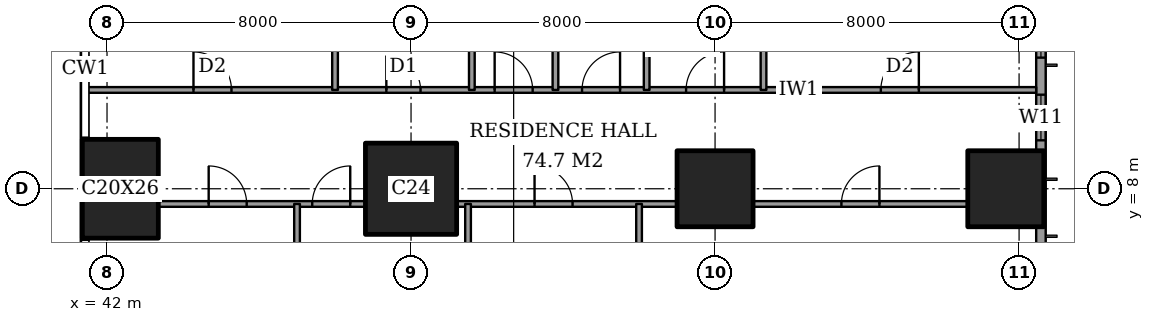
"""IFC4 building model, lengths in metres.
Left out: names, types, materials, properties, quantities, classifications, styles, units other than length and angle.
Written with IfcOpenShell. Run it as: python <this file> out.ifc"""

import sys

from ifc_helpers import new_model, si_unit, direction, frame, frame_2d, origin, origin_2d, place, context, subcontext, project, spatial, rectangle, extrude, element, fill, save


model = new_model("IFC4")
c1 = context("Model", 3, precision=1e-05, world=origin(), true_north=direction((0.0, 1.0)))
c2 = subcontext(c1, "Body", "Model", "MODEL_VIEW")
j1 = project(units=[si_unit("LENGTHUNIT", "METRE"), si_unit("PLANEANGLEUNIT", "RADIAN")], contexts=[c1])
p1 = place(None, origin())
s1 = spatial("IfcSite", under=j1, at=p1, CompositionType="ELEMENT")
p2 = place(p1, origin())
s2 = spatial("IfcBuilding", under=s1, at=p2, CompositionType="ELEMENT")
p3 = place(p2, frame((0.0, 0.0, 103.4)))
s3 = spatial("IfcBuildingStorey", under=s2, at=p3, CompositionType="ELEMENT", Elevation=103.4)
p4 = place(p3, frame((42.35, 8.0, 0.0), z_axis=(0.0, 0.0, 1.0), x_axis=(1.0, 0.0, 0.0)))
e1 = element("IfcColumn", 1, at=p4, inside=s3, PredefinedType="COLUMN", context=c2, shape_type="SweptSolid", body=[
    extrude(rectangle(XDim=2.0, YDim=2.6, at=origin_2d()), origin(), (0.0, 0.0, 1.0), 3.6),
])
p5 = place(p3, frame((50.0, 8.0, 0.0), z_axis=(0.0, 0.0, 1.0), x_axis=(1.0, 0.0, 0.0)))
e2 = element("IfcColumn", 2, at=p5, inside=s3, PredefinedType="COLUMN", context=c2, shape_type="SweptSolid", body=[
    extrude(rectangle(XDim=2.4, YDim=2.4, at=origin_2d()), origin(), (0.0, 0.0, 1.0), 3.6),
])
for number, where, z_axis, x_axis in (
    (3, (58.0, 8.0, 0.0), (0.0, 0.0, 1.0), (1.0, 0.0, 0.0)),
    (4, (65.65, 8.0, 0.0), (0.0, 0.0, 1.0), (1.0, 0.0, 0.0)),
):
    element("IfcColumn", number, at=place(p3, frame(where, z_axis=z_axis, x_axis=x_axis)), inside=s3, PredefinedType="COLUMN", context=c2, shape_type="SweptSolid", body=[
        extrude(rectangle(XDim=2.0, YDim=2.0, at=origin_2d()), origin(), (0.0, 0.0, 1.0), 3.6),
    ])
p6 = place(p3, frame((66.575, 3.175, 0.0), z_axis=(0.0, 0.0, 1.0), x_axis=(0.0, 1.0, 0.0)))
e5 = element("IfcWall", 5, at=p6, inside=s3, PredefinedType="SOLIDWALL", context=c2, shape_type="SweptSolid", body=[
    extrude(rectangle(XDim=41.65, YDim=0.25, at=frame_2d((20.825, 0.0))), origin(), (0.0, 0.0, 1.0), 3.6),
])
p7 = place(p6, frame((0.775, 0.0, 0.4)))
e6 = element("IfcOpeningElement", 6, at=p7, cuts=e5, PredefinedType="OPENING", context=c2, shape_type="SweptSolid", body=[
    extrude(rectangle(XDim=2.4, YDim=2.2, at=frame_2d((1.2, 1.1))), frame((0.0, 0.135, 0.0), z_axis=(0.0, -1.0, 0.0), x_axis=(1.0, 0.0, 0.0)), (0.0, 0.0, 1.0), 0.27),
])
p8 = place(p6, frame((6.1, 0.0, 0.4)))
e7 = element("IfcOpeningElement", 7, at=p8, cuts=e5, PredefinedType="OPENING", context=c2, shape_type="SweptSolid", body=[
    extrude(rectangle(XDim=1.2, YDim=2.2, at=frame_2d((0.6, 1.1))), frame((0.0, 0.135, 0.0), z_axis=(0.0, -1.0, 0.0), x_axis=(1.0, 0.0, 0.0)), (0.0, 0.0, 1.0), 0.27),
])
p9 = place(p6, frame((8.275, 0.0, 0.4)))
e8 = element("IfcOpeningElement", 8, at=p9, cuts=e5, PredefinedType="OPENING", context=c2, shape_type="SweptSolid", body=[
    extrude(rectangle(XDim=2.4, YDim=2.2, at=frame_2d((1.2, 1.1))), frame((0.0, 0.135, 0.0), z_axis=(0.0, -1.0, 0.0), x_axis=(1.0, 0.0, 0.0)), (0.0, 0.0, 1.0), 0.27),
])
p10 = place(p6, frame((15.775, 0.0, 0.4)))
e9 = element("IfcOpeningElement", 9, at=p10, cuts=e5, PredefinedType="OPENING", context=c2, shape_type="SweptSolid", body=[
    extrude(rectangle(XDim=2.4, YDim=2.2, at=frame_2d((1.2, 1.1))), frame((0.0, 0.135, 0.0), z_axis=(0.0, -1.0, 0.0), x_axis=(1.0, 0.0, 0.0)), (0.0, 0.0, 1.0), 0.27),
])
p11 = place(p6, frame((23.475, 0.0, 0.4)))
e10 = element("IfcOpeningElement", 10, at=p11, cuts=e5, PredefinedType="OPENING", context=c2, shape_type="SweptSolid", body=[
    extrude(rectangle(XDim=2.4, YDim=2.2, at=frame_2d((1.2, 1.1))), frame((0.0, 0.135, 0.0), z_axis=(0.0, -1.0, 0.0), x_axis=(1.0, 0.0, 0.0)), (0.0, 0.0, 1.0), 0.27),
])
p12 = place(p6, frame((30.975, 0.0, 0.4)))
e11 = element("IfcOpeningElement", 11, at=p12, cuts=e5, PredefinedType="OPENING", context=c2, shape_type="SweptSolid", body=[
    extrude(rectangle(XDim=2.4, YDim=2.2, at=frame_2d((1.2, 1.1))), frame((0.0, 0.135, 0.0), z_axis=(0.0, -1.0, 0.0), x_axis=(1.0, 0.0, 0.0)), (0.0, 0.0, 1.0), 0.27),
])
p13 = place(p6, frame((34.5, 0.0, 0.4)))
e12 = element("IfcOpeningElement", 12, at=p13, cuts=e5, PredefinedType="OPENING", context=c2, shape_type="SweptSolid", body=[
    extrude(rectangle(XDim=1.2, YDim=2.2, at=frame_2d((0.6, 1.1))), frame((0.0, 0.135, 0.0), z_axis=(0.0, -1.0, 0.0), x_axis=(1.0, 0.0, 0.0)), (0.0, 0.0, 1.0), 0.27),
])
p14 = place(p6, frame((38.475, 0.0, 0.4)))
e13 = element("IfcOpeningElement", 13, at=p14, cuts=e5, PredefinedType="OPENING", context=c2, shape_type="SweptSolid", body=[
    extrude(rectangle(XDim=2.4, YDim=2.2, at=frame_2d((1.2, 1.1))), frame((0.0, 0.135, 0.0), z_axis=(0.0, -1.0, 0.0), x_axis=(1.0, 0.0, 0.0)), (0.0, 0.0, 1.0), 0.27),
])
p15 = place(p3, frame((43.35, 7.6, 0.0), z_axis=(0.0, 0.0, 1.0), x_axis=(1.0, 0.0, 0.0)))
e14 = element("IfcWall", 14, at=p15, inside=s3, PredefinedType="PARTITIONING", context=c2, shape_type="SweptSolid", body=[
    extrude(rectangle(XDim=5.45, YDim=0.15, at=frame_2d((2.725, 0.0))), origin(), (0.0, 0.0, 1.0), 3.35),
])
p16 = place(p15, frame((4.05, 0.0, 0.0)))
e15 = element("IfcOpeningElement", 15, at=p16, cuts=e14, PredefinedType="OPENING", context=c2, shape_type="SweptSolid", body=[
    extrude(rectangle(XDim=1.0, YDim=2.1, at=frame_2d((0.5, 1.05))), frame((0.0, 0.085, 0.0), z_axis=(0.0, -1.0, 0.0), x_axis=(1.0, 0.0, 0.0)), (0.0, 0.0, 1.0), 0.17),
])
p17 = place(p15, frame((1.325, 0.0, 0.0)))
e16 = element("IfcOpeningElement", 16, at=p17, cuts=e14, PredefinedType="OPENING", context=c2, shape_type="SweptSolid", body=[
    extrude(rectangle(XDim=1.0, YDim=2.1, at=frame_2d((0.5, 1.05))), frame((0.0, 0.085, 0.0), z_axis=(0.0, -1.0, 0.0), x_axis=(1.0, 0.0, 0.0)), (0.0, 0.0, 1.0), 0.17),
])
p18 = place(p3, frame((51.2, 7.6, 0.0), z_axis=(0.0, 0.0, 1.0), x_axis=(1.0, 0.0, 0.0)))
e17 = element("IfcWall", 17, at=p18, inside=s3, PredefinedType="PARTITIONING", context=c2, shape_type="SweptSolid", body=[
    extrude(rectangle(XDim=5.8, YDim=0.15, at=frame_2d((2.9, 0.0))), origin(), (0.0, 0.0, 1.0), 3.35),
])
p19 = place(p18, frame((2.05, 0.0, 0.0)))
e18 = element("IfcOpeningElement", 18, at=p19, cuts=e17, PredefinedType="OPENING", context=c2, shape_type="SweptSolid", body=[
    extrude(rectangle(XDim=1.0, YDim=2.1, at=frame_2d((0.5, 1.05))), frame((0.0, 0.085, 0.0), z_axis=(0.0, -1.0, 0.0), x_axis=(1.0, 0.0, 0.0)), (0.0, 0.0, 1.0), 0.17),
])
p20 = place(p3, frame((59.0, 7.6, 0.0), z_axis=(0.0, 0.0, 1.0), x_axis=(1.0, 0.0, 0.0)))
e19 = element("IfcWall", 19, at=p20, inside=s3, PredefinedType="PARTITIONING", context=c2, shape_type="SweptSolid", body=[
    extrude(rectangle(XDim=5.65, YDim=0.15, at=frame_2d((2.825, 0.0))), origin(), (0.0, 0.0, 1.0), 3.35),
])
p21 = place(p20, frame((2.325, 0.0, 0.0)))
e20 = element("IfcOpeningElement", 20, at=p21, cuts=e19, PredefinedType="OPENING", context=c2, shape_type="SweptSolid", body=[
    extrude(rectangle(XDim=1.0, YDim=2.1, at=frame_2d((0.5, 1.05))), frame((0.0, 0.085, 0.0), z_axis=(0.0, -1.0, 0.0), x_axis=(1.0, 0.0, 0.0)), (0.0, 0.0, 1.0), 0.17),
])
p22 = place(p3, frame((41.439, 10.6, 0.0), z_axis=(0.0, 0.0, 1.0), x_axis=(1.0, 0.0, 0.0)))
e21 = element("IfcWall", 21, at=p22, inside=s3, PredefinedType="PARTITIONING", context=c2, shape_type="SweptSolid", body=[
    extrude(rectangle(XDim=25.011, YDim=0.15, at=frame_2d((12.505, 0.0))), origin(), (0.0, 0.0, 1.0), 3.35),
])
p23 = place(p22, frame((10.761, 0.0, 0.0)))
e22 = element("IfcOpeningElement", 22, at=p23, cuts=e21, PredefinedType="OPENING", context=c2, shape_type="SweptSolid", body=[
    extrude(rectangle(XDim=1.0, YDim=2.1, at=frame_2d((0.5, 1.05))), frame((0.0, 0.085, 0.0), z_axis=(0.0, -1.0, 0.0), x_axis=(1.0, 0.0, 0.0)), (0.0, 0.0, 1.0), 0.17),
])
p24 = place(p22, frame((20.924, 0.0, 0.0)))
e23 = element("IfcOpeningElement", 23, at=p24, cuts=e21, PredefinedType="OPENING", context=c2, shape_type="SweptSolid", body=[
    extrude(rectangle(XDim=1.0, YDim=2.1, at=frame_2d((0.5, 1.05))), frame((0.0, 0.085, 0.0), z_axis=(0.0, -1.0, 0.0), x_axis=(1.0, 0.0, 0.0)), (0.0, 0.0, 1.0), 0.17),
])
p25 = place(p22, frame((15.799, 0.0, 0.0)))
e24 = element("IfcOpeningElement", 24, at=p25, cuts=e21, PredefinedType="OPENING", context=c2, shape_type="SweptSolid", body=[
    extrude(rectangle(XDim=1.0, YDim=2.1, at=frame_2d((0.5, 1.05))), frame((0.0, 0.085, 0.0), z_axis=(0.0, -1.0, 0.0), x_axis=(1.0, 0.0, 0.0)), (0.0, 0.0, 1.0), 0.17),
])
p26 = place(p22, frame((13.061, 0.0, 0.0)))
e25 = element("IfcOpeningElement", 25, at=p26, cuts=e21, PredefinedType="OPENING", context=c2, shape_type="SweptSolid", body=[
    extrude(rectangle(XDim=1.0, YDim=2.1, at=frame_2d((0.5, 1.05))), frame((0.0, 0.085, 0.0), z_axis=(0.0, -1.0, 0.0), x_axis=(1.0, 0.0, 0.0)), (0.0, 0.0, 1.0), 0.17),
])
p27 = place(p22, frame((7.911, 0.0, 0.0)))
e26 = element("IfcOpeningElement", 26, at=p27, cuts=e21, PredefinedType="OPENING", context=c2, shape_type="SweptSolid", body=[
    extrude(rectangle(XDim=0.9, YDim=2.1, at=frame_2d((0.45, 1.05))), frame((0.0, 0.085, 0.0), z_axis=(0.0, -1.0, 0.0), x_axis=(1.0, 0.0, 0.0)), (0.0, 0.0, 1.0), 0.17),
])
p28 = place(p22, frame((2.836, 0.0, 0.0)))
e27 = element("IfcOpeningElement", 27, at=p28, cuts=e21, PredefinedType="OPENING", context=c2, shape_type="SweptSolid", body=[
    extrude(rectangle(XDim=1.0, YDim=2.1, at=frame_2d((0.5, 1.05))), frame((0.0, 0.085, 0.0), z_axis=(0.0, -1.0, 0.0), x_axis=(1.0, 0.0, 0.0)), (0.0, 0.0, 1.0), 0.17),
])
p29 = place(p3, frame((47.0, -0.45, 0.0), z_axis=(0.0, 0.0, 1.0), x_axis=(0.0, 1.0, 0.0)))
e28 = element("IfcWall", 28, at=p29, inside=s3, PredefinedType="PARTITIONING", context=c2, shape_type="SweptSolid", body=[
    extrude(rectangle(XDim=8.05, YDim=0.15, at=frame_2d((4.025, 0.0))), origin(), (0.0, 0.0, 1.0), 3.35),
])
p30 = place(p3, frame((48.0, 10.6, 0.0), z_axis=(0.0, 0.0, 1.0), x_axis=(0.0, 1.0, 0.0)))
e29 = element("IfcWall", 29, at=p30, inside=s3, PredefinedType="PARTITIONING", context=c2, shape_type="SweptSolid", body=[
    extrude(rectangle(XDim=13.4, YDim=0.15, at=frame_2d((6.7, 0.0))), origin(), (0.0, 0.0, 1.0), 3.35),
])
p31 = place(p30, frame((10.8, 0.0, 0.0)))
e30 = element("IfcOpeningElement", 30, at=p31, cuts=e29, PredefinedType="OPENING", context=c2, shape_type="SweptSolid", body=[
    extrude(rectangle(XDim=1.2, YDim=2.4, at=frame_2d((0.6, 1.2))), frame((0.0, 0.085, 0.0), z_axis=(0.0, -1.0, 0.0), x_axis=(1.0, 0.0, 0.0)), (0.0, 0.0, 1.0), 0.17),
])
p32 = place(p30, frame((6.7, 0.0, 0.0)))
e31 = element("IfcOpeningElement", 31, at=p32, cuts=e29, PredefinedType="OPENING", context=c2, shape_type="SweptSolid", body=[
    extrude(rectangle(XDim=0.9, YDim=2.1, at=frame_2d((0.45, 1.05))), frame((0.0, 0.085, 0.0), z_axis=(0.0, -1.0, 0.0), x_axis=(1.0, 0.0, 0.0)), (0.0, 0.0, 1.0), 0.17),
])
p33 = place(p3, frame((51.5, -0.45, 0.0), z_axis=(0.0, 0.0, 1.0), x_axis=(0.0, 1.0, 0.0)))
e32 = element("IfcWall", 32, at=p33, inside=s3, PredefinedType="PARTITIONING", context=c2, shape_type="SweptSolid", body=[
    extrude(rectangle(XDim=8.05, YDim=0.15, at=frame_2d((4.025, 0.0))), origin(), (0.0, 0.0, 1.0), 3.35),
])
for number, where, z_axis, x_axis in (
    (33, (51.6, 10.6, 0.0), (0.0, 0.0, 1.0), (0.0, 1.0, 0.0)),
    (34, (53.8, 10.6, 0.0), (0.0, 0.0, 1.0), (0.0, 1.0, 0.0)),
):
    element("IfcWall", number, at=place(p3, frame(where, z_axis=z_axis, x_axis=x_axis)), inside=s3, PredefinedType="PARTITIONING", context=c2, shape_type="SweptSolid", body=[
        extrude(rectangle(XDim=4.0, YDim=0.15, at=frame_2d((2.0, 0.0))), origin(), (0.0, 0.0, 1.0), 3.35),
    ])
p34 = place(p3, frame((56.0, -0.45, 0.0), z_axis=(0.0, 0.0, 1.0), x_axis=(0.0, 1.0, 0.0)))
e35 = element("IfcWall", 35, at=p34, inside=s3, PredefinedType="PARTITIONING", context=c2, shape_type="SweptSolid", body=[
    extrude(rectangle(XDim=8.05, YDim=0.15, at=frame_2d((4.025, 0.0))), origin(), (0.0, 0.0, 1.0), 3.35),
])
p35 = place(p3, frame((56.2, 10.6, 0.0), z_axis=(0.0, 0.0, 1.0), x_axis=(0.0, 1.0, 0.0)))
e36 = element("IfcWall", 36, at=p35, inside=s3, PredefinedType="PARTITIONING", context=c2, shape_type="SweptSolid", body=[
    extrude(rectangle(XDim=11.0, YDim=0.15, at=frame_2d((5.5, 0.0))), origin(), (0.0, 0.0, 1.0), 3.35),
])
p36 = place(p35, frame((7.0, 0.0, 0.0)))
e37 = element("IfcOpeningElement", 37, at=p36, cuts=e36, PredefinedType="OPENING", context=c2, shape_type="SweptSolid", body=[
    extrude(rectangle(XDim=1.0, YDim=2.1, at=frame_2d((0.5, 1.05))), frame((0.0, 0.085, 0.0), z_axis=(0.0, -1.0, 0.0), x_axis=(1.0, 0.0, 0.0)), (0.0, 0.0, 1.0), 0.17),
])
p37 = place(p3, frame((59.275, 10.6, 0.0), z_axis=(0.0, 0.0, 1.0), x_axis=(0.0, 1.0, 0.0)))
e38 = element("IfcWall", 38, at=p37, inside=s3, PredefinedType="PARTITIONING", context=c2, shape_type="SweptSolid", body=[
    extrude(rectangle(XDim=4.2, YDim=0.15, at=frame_2d((2.1, 0.0))), origin(), (0.0, 0.0, 1.0), 3.35),
])
p38 = place(p8, origin())
e39 = element("IfcWindow", 39, at=p38, inside=s3, PartitioningType="SINGLE_PANEL", PredefinedType="WINDOW", context=c2, shape_type="SweptSolid", body=[
    extrude(rectangle(XDim=1.2, YDim=2.2, at=frame_2d((0.6, 1.1))), frame((0.0, 0.03, 0.0), z_axis=(0.0, -1.0, 0.0), x_axis=(1.0, 0.0, 0.0)), (0.0, 0.0, 1.0), 0.06),
])
fill(e7, e39)
p39 = place(p9, origin())
e40 = element("IfcWindow", 40, at=p39, inside=s3, PartitioningType="SINGLE_PANEL", PredefinedType="WINDOW", context=c2, shape_type="SweptSolid", body=[
    extrude(rectangle(XDim=2.4, YDim=2.2, at=frame_2d((1.2, 1.1))), frame((0.0, 0.03, 0.0), z_axis=(0.0, -1.0, 0.0), x_axis=(1.0, 0.0, 0.0)), (0.0, 0.0, 1.0), 0.06),
])
fill(e8, e40)
p40 = place(p21, origin())
e41 = element("IfcDoor", 41, at=p40, inside=s3, OperationType="SINGLE_SWING_LEFT", PredefinedType="DOOR", context=c2, shape_type="SweptSolid", body=[
    extrude(rectangle(XDim=1.0, YDim=2.1, at=frame_2d((0.5, 1.05))), frame((0.0, 0.025, 0.0), z_axis=(0.0, -1.0, 0.0), x_axis=(1.0, 0.0, 0.0)), (0.0, 0.0, 1.0), 0.05),
])
fill(e20, e41)
p41 = place(p19, origin())
e42 = element("IfcDoor", 42, at=p41, inside=s3, OperationType="SINGLE_SWING_RIGHT", PredefinedType="DOOR", context=c2, shape_type="SweptSolid", body=[
    extrude(rectangle(XDim=1.0, YDim=2.1, at=frame_2d((0.5, 1.05))), frame((0.0, 0.025, 0.0), z_axis=(0.0, -1.0, 0.0), x_axis=(1.0, 0.0, 0.0)), (0.0, 0.0, 1.0), 0.05),
])
fill(e18, e42)
p42 = place(p16, origin())
e43 = element("IfcDoor", 43, at=p42, inside=s3, OperationType="SINGLE_SWING_LEFT", PredefinedType="DOOR", context=c2, shape_type="SweptSolid", body=[
    extrude(rectangle(XDim=1.0, YDim=2.1, at=frame_2d((0.5, 1.05))), frame((0.0, 0.025, 0.0), z_axis=(0.0, -1.0, 0.0), x_axis=(1.0, 0.0, 0.0)), (0.0, 0.0, 1.0), 0.05),
])
fill(e15, e43)
p43 = place(p17, origin())
e44 = element("IfcDoor", 44, at=p43, inside=s3, OperationType="SINGLE_SWING_RIGHT", PredefinedType="DOOR", context=c2, shape_type="SweptSolid", body=[
    extrude(rectangle(XDim=1.0, YDim=2.1, at=frame_2d((0.5, 1.05))), frame((0.0, 0.025, 0.0), z_axis=(0.0, -1.0, 0.0), x_axis=(1.0, 0.0, 0.0)), (0.0, 0.0, 1.0), 0.05),
])
fill(e16, e44)
p44 = place(p23, origin())
e45 = element("IfcDoor", 45, at=p44, inside=s3, OperationType="SINGLE_SWING_RIGHT", PredefinedType="DOOR", context=c2, shape_type="SweptSolid", body=[
    extrude(rectangle(XDim=1.0, YDim=2.1, at=frame_2d((0.5, 1.05))), frame((0.0, 0.025, 0.0), z_axis=(0.0, -1.0, 0.0), x_axis=(1.0, 0.0, 0.0)), (0.0, 0.0, 1.0), 0.05),
])
fill(e22, e45)
p45 = place(p24, origin())
e46 = element("IfcDoor", 46, at=p45, inside=s3, OperationType="SINGLE_SWING_LEFT", PredefinedType="DOOR", context=c2, shape_type="SweptSolid", body=[
    extrude(rectangle(XDim=1.0, YDim=2.1, at=frame_2d((0.5, 1.05))), frame((0.0, 0.025, 0.0), z_axis=(0.0, -1.0, 0.0), x_axis=(1.0, 0.0, 0.0)), (0.0, 0.0, 1.0), 0.05),
])
fill(e23, e46)
p46 = place(p25, origin())
e47 = element("IfcDoor", 47, at=p46, inside=s3, OperationType="SINGLE_SWING_LEFT", PredefinedType="DOOR", context=c2, shape_type="SweptSolid", body=[
    extrude(rectangle(XDim=1.0, YDim=2.1, at=frame_2d((0.5, 1.05))), frame((0.0, 0.025, 0.0), z_axis=(0.0, -1.0, 0.0), x_axis=(1.0, 0.0, 0.0)), (0.0, 0.0, 1.0), 0.05),
])
fill(e24, e47)
p47 = place(p26, origin())
e48 = element("IfcDoor", 48, at=p47, inside=s3, OperationType="SINGLE_SWING_LEFT", PredefinedType="DOOR", context=c2, shape_type="SweptSolid", body=[
    extrude(rectangle(XDim=1.0, YDim=2.1, at=frame_2d((0.5, 1.05))), frame((0.0, 0.025, 0.0), z_axis=(0.0, -1.0, 0.0), x_axis=(1.0, 0.0, 0.0)), (0.0, 0.0, 1.0), 0.05),
])
fill(e25, e48)
p48 = place(p27, origin())
e49 = element("IfcDoor", 49, at=p48, inside=s3, OperationType="SINGLE_SWING_RIGHT", PredefinedType="DOOR", context=c2, shape_type="SweptSolid", body=[
    extrude(rectangle(XDim=0.9, YDim=2.1, at=frame_2d((0.45, 1.05))), frame((0.0, 0.025, 0.0), z_axis=(0.0, -1.0, 0.0), x_axis=(1.0, 0.0, 0.0)), (0.0, 0.0, 1.0), 0.05),
])
fill(e26, e49)
p49 = place(p28, origin())
e50 = element("IfcDoor", 50, at=p49, inside=s3, OperationType="SINGLE_SWING_RIGHT", PredefinedType="DOOR", context=c2, shape_type="SweptSolid", body=[
    extrude(rectangle(XDim=1.0, YDim=2.1, at=frame_2d((0.5, 1.05))), frame((0.0, 0.025, 0.0), z_axis=(0.0, -1.0, 0.0), x_axis=(1.0, 0.0, 0.0)), (0.0, 0.0, 1.0), 0.05),
])
fill(e27, e50)
save(model, sys.argv[1])
